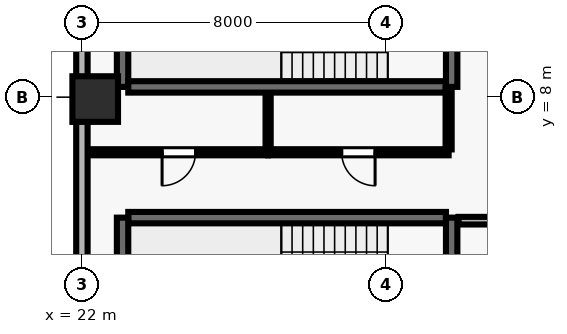
"""IFC4 building model, lengths in metres.
Left out: names, types, materials, properties, quantities, classifications, styles, units other than length and angle.
Written with IfcOpenShell. Run it as: python <this file> out.ifc"""

import sys

from ifc_helpers import new_model, si_unit, direction, frame, frame_2d, origin, origin_2d, place, context, subcontext, project, spatial, rectangle, extrude, element, fill, save


model = new_model("IFC4")
c1 = context("Model", 3, precision=1e-05, world=origin(), true_north=direction((0.0, 1.0)))
c2 = subcontext(c1, "Body", "Model", "MODEL_VIEW")
j1 = project(units=[si_unit("LENGTHUNIT", "METRE"), si_unit("PLANEANGLEUNIT", "RADIAN")], contexts=[c1])
p1 = place(None, origin())
s1 = spatial("IfcSite", under=j1, at=p1, CompositionType="ELEMENT")
p2 = place(p1, origin())
s2 = spatial("IfcBuilding", under=s1, at=p2, CompositionType="ELEMENT")
p3 = place(p2, frame((0.0, 0.0, 158.0)))
s3 = spatial("IfcBuildingStorey", under=s2, at=p3, CompositionType="ELEMENT", Elevation=158.0)
p4 = place(p3, frame((22.35, 7.95, 0.0), z_axis=(0.0, 0.0, 1.0), x_axis=(1.0, 0.0, 0.0)))
e1 = element("IfcColumn", 1, at=p4, inside=s3, PredefinedType="COLUMN", context=c2, shape_type="SweptSolid", body=[
    extrude(rectangle(XDim=1.2, YDim=1.2, at=origin_2d()), origin(), (0.0, 0.0, 1.0), 3.9),
])
p5 = place(p3, frame((22.0, 46.1, 0.0), z_axis=(0.0, 0.0, 1.0), x_axis=(0.0, -1.0, 0.0)))
e2 = element("IfcWall", 2, at=p5, inside=s3, PredefinedType="SOLIDWALL", context=c2, shape_type="SweptSolid", body=[
    extrude(rectangle(XDim=43.6, YDim=0.3, at=frame_2d((21.8, 0.0))), origin(), (0.0, 0.0, 1.0), 3.69),
])
p6 = place(p5, frame((7.1, 0.0, 0.0)))
e3 = element("IfcOpeningElement", 3, at=p6, cuts=e2, PredefinedType="OPENING", context=c2, shape_type="SweptSolid", body=[
    extrude(rectangle(XDim=1.0, YDim=2.2, at=frame_2d((0.5, 1.1))), frame((0.0, 0.16, 0.0), z_axis=(0.0, -1.0, 0.0), x_axis=(1.0, 0.0, 0.0)), (0.0, 0.0, 1.0), 0.32),
])
p7 = place(p5, frame((1.825, 0.0, 0.9)))
e4 = element("IfcOpeningElement", 4, at=p7, cuts=e2, PredefinedType="OPENING", context=c2, shape_type="SweptSolid", body=[
    extrude(rectangle(XDim=1.8, YDim=1.6, at=frame_2d((0.9, 0.8))), frame((0.0, 0.16, 0.0), z_axis=(0.0, -1.0, 0.0), x_axis=(1.0, 0.0, 0.0)), (0.0, 0.0, 1.0), 0.32),
])
p8 = place(p5, frame((13.625, 0.0, 0.9)))
e5 = element("IfcOpeningElement", 5, at=p8, cuts=e2, PredefinedType="OPENING", context=c2, shape_type="SweptSolid", body=[
    extrude(rectangle(XDim=1.8, YDim=1.6, at=frame_2d((0.9, 0.8))), frame((0.0, 0.16, 0.0), z_axis=(0.0, -1.0, 0.0), x_axis=(1.0, 0.0, 0.0)), (0.0, 0.0, 1.0), 0.32),
])
p9 = place(p5, frame((17.725, 0.0, 0.9)))
e6 = element("IfcOpeningElement", 6, at=p9, cuts=e2, PredefinedType="OPENING", context=c2, shape_type="SweptSolid", body=[
    extrude(rectangle(XDim=1.8, YDim=1.6, at=frame_2d((0.9, 0.8))), frame((0.0, 0.16, 0.0), z_axis=(0.0, -1.0, 0.0), x_axis=(1.0, 0.0, 0.0)), (0.0, 0.0, 1.0), 0.32),
])
p10 = place(p5, frame((23.625, 0.0, 0.9)))
e7 = element("IfcOpeningElement", 7, at=p10, cuts=e2, PredefinedType="OPENING", context=c2, shape_type="SweptSolid", body=[
    extrude(rectangle(XDim=1.8, YDim=1.6, at=frame_2d((0.9, 0.8))), frame((0.0, 0.16, 0.0), z_axis=(0.0, -1.0, 0.0), x_axis=(1.0, 0.0, 0.0)), (0.0, 0.0, 1.0), 0.32),
])
p11 = place(p5, frame((28.625, 0.0, 0.9)))
e8 = element("IfcOpeningElement", 8, at=p11, cuts=e2, PredefinedType="OPENING", context=c2, shape_type="SweptSolid", body=[
    extrude(rectangle(XDim=1.8, YDim=1.6, at=frame_2d((0.9, 0.8))), frame((0.0, 0.16, 0.0), z_axis=(0.0, -1.0, 0.0), x_axis=(1.0, 0.0, 0.0)), (0.0, 0.0, 1.0), 0.32),
])
p12 = place(p5, frame((34.525, 0.0, 0.9)))
e9 = element("IfcOpeningElement", 9, at=p12, cuts=e2, PredefinedType="OPENING", context=c2, shape_type="SweptSolid", body=[
    extrude(rectangle(XDim=1.8, YDim=1.6, at=frame_2d((0.9, 0.8))), frame((0.0, 0.16, 0.0), z_axis=(0.0, -1.0, 0.0), x_axis=(1.0, 0.0, 0.0)), (0.0, 0.0, 1.0), 0.32),
])
p13 = place(p3, frame((31.58, 4.83, 0.0), z_axis=(0.0, 0.0, 1.0), x_axis=(-1.0, 0.0, 0.0)))
e10 = element("IfcWall", 10, at=p13, inside=s3, PredefinedType="SHEAR", context=c2, shape_type="SweptSolid", body=[
    extrude(rectangle(XDim=8.36, YDim=0.3, at=frame_2d((4.18, 0.0))), origin(), (0.0, 0.0, 1.0), 3.69),
])
p14 = place(p3, frame((23.07, 4.83, 0.0), z_axis=(0.0, 0.0, 1.0), x_axis=(0.0, -1.0, 0.0)))
e11 = element("IfcWall", 11, at=p14, inside=s3, PredefinedType="SHEAR", context=c2, shape_type="SweptSolid", body=[
    extrude(rectangle(XDim=3.51, YDim=0.3, at=frame_2d((1.755, 0.0))), origin(), (0.0, 0.0, 1.0), 3.69),
])
p15 = place(p3, frame((31.73, 0.96, 0.0), z_axis=(0.0, 0.0, 1.0), x_axis=(0.0, 1.0, 0.0)))
e12 = element("IfcWall", 12, at=p15, inside=s3, PredefinedType="SHEAR", context=c2, shape_type="SweptSolid", body=[
    extrude(rectangle(XDim=3.87, YDim=0.3, at=frame_2d((1.935, 0.0))), origin(), (0.0, 0.0, 1.0), 3.69),
])
p16 = place(p15, frame((1.54, 0.0, 0.0)))
e13 = element("IfcOpeningElement", 13, at=p16, cuts=e12, PredefinedType="OPENING", context=c2, shape_type="SweptSolid", body=[
    extrude(rectangle(XDim=1.15, YDim=2.15, at=frame_2d((0.575, 1.075))), frame((0.0, 0.16, 0.0), z_axis=(0.0, -1.0, 0.0), x_axis=(1.0, 0.0, 0.0)), (0.0, 0.0, 1.0), 0.32),
])
p17 = place(p3, frame((23.07, 11.78, 0.0), z_axis=(0.0, 0.0, 1.0), x_axis=(0.0, -1.0, 0.0)))
e14 = element("IfcWall", 14, at=p17, inside=s3, PredefinedType="SHEAR", context=c2, shape_type="SweptSolid", body=[
    extrude(rectangle(XDim=3.51, YDim=0.3, at=frame_2d((1.755, 0.0))), origin(), (0.0, 0.0, 1.0), 3.69),
])
p18 = place(p3, frame((23.22, 8.27, 0.0), z_axis=(0.0, 0.0, 1.0), x_axis=(1.0, 0.0, 0.0)))
e15 = element("IfcWall", 15, at=p18, inside=s3, PredefinedType="SHEAR", context=c2, shape_type="SweptSolid", body=[
    extrude(rectangle(XDim=8.36, YDim=0.3, at=frame_2d((4.18, 0.0))), origin(), (0.0, 0.0, 1.0), 3.69),
])
p19 = place(p3, frame((31.73, 8.27, 0.0), z_axis=(0.0, 0.0, 1.0), x_axis=(0.0, 1.0, 0.0)))
e16 = element("IfcWall", 16, at=p19, inside=s3, PredefinedType="SHEAR", context=c2, shape_type="SweptSolid", body=[
    extrude(rectangle(XDim=3.51, YDim=0.3, at=frame_2d((1.755, 0.0))), origin(), (0.0, 0.0, 1.0), 3.69),
])
p20 = place(p19, frame((1.18, 0.0, 0.0)))
e17 = element("IfcOpeningElement", 17, at=p20, cuts=e16, PredefinedType="OPENING", context=c2, shape_type="SweptSolid", body=[
    extrude(rectangle(XDim=1.15, YDim=2.15, at=frame_2d((0.575, 1.075))), frame((0.0, 0.16, 0.0), z_axis=(0.0, -1.0, 0.0), x_axis=(1.0, 0.0, 0.0)), (0.0, 0.0, 1.0), 0.32),
])
p21 = place(p3, frame((26.9, 6.55, 0.0), z_axis=(0.0, 0.0, 1.0), x_axis=(-1.0, 0.0, 0.0)))
e18 = element("IfcWall", 18, at=p21, inside=s3, PredefinedType="PARTITIONING", context=c2, shape_type="SweptSolid", body=[
    extrude(rectangle(XDim=4.7, YDim=0.16, at=frame_2d((2.35, 0.0))), origin(), (0.0, 0.0, 1.0), 3.69),
])
p22 = place(p21, frame((1.91, 0.0, 0.0)))
e19 = element("IfcOpeningElement", 19, at=p22, cuts=e18, PredefinedType="OPENING", context=c2, shape_type="SweptSolid", body=[
    extrude(rectangle(XDim=0.88, YDim=2.1, at=frame_2d((0.44, 1.05))), frame((0.0, 0.09, 0.0), z_axis=(0.0, -1.0, 0.0), x_axis=(1.0, 0.0, 0.0)), (0.0, 0.0, 1.0), 0.18),
])
p23 = place(p3, frame((31.65, 6.55, 0.0), z_axis=(0.0, 0.0, 1.0), x_axis=(-1.0, 0.0, 0.0)))
e20 = element("IfcWall", 20, at=p23, inside=s3, PredefinedType="PARTITIONING", context=c2, shape_type="SweptSolid", body=[
    extrude(rectangle(XDim=4.75, YDim=0.16, at=frame_2d((2.375, 0.0))), origin(), (0.0, 0.0, 1.0), 3.69),
])
p24 = place(p23, frame((1.935, 0.0, 0.0)))
e21 = element("IfcOpeningElement", 21, at=p24, cuts=e20, PredefinedType="OPENING", context=c2, shape_type="SweptSolid", body=[
    extrude(rectangle(XDim=0.88, YDim=2.1, at=frame_2d((0.44, 1.05))), frame((0.0, 0.09, 0.0), z_axis=(0.0, -1.0, 0.0), x_axis=(1.0, 0.0, 0.0)), (0.0, 0.0, 1.0), 0.18),
])
p25 = place(p3, frame((35.02, 4.75, 0.0), z_axis=(0.0, 0.0, 1.0), x_axis=(-1.0, 0.0, 0.0)))
e22 = element("IfcWall", 22, at=p25, inside=s3, PredefinedType="SOLIDWALL", context=c2, shape_type="SweptSolid", body=[
    extrude(rectangle(XDim=3.11, YDim=0.2, at=frame_2d((1.555, 0.0))), origin(), (0.0, 0.0, 1.0), 3.69),
])
p26 = place(p25, frame((1.03, 0.0, 0.0)))
e23 = element("IfcOpeningElement", 23, at=p26, cuts=e22, PredefinedType="OPENING", context=c2, shape_type="SweptSolid", body=[
    extrude(rectangle(XDim=1.05, YDim=2.15, at=frame_2d((0.525, 1.075))), frame((0.0, 0.11, 0.0), z_axis=(0.0, -1.0, 0.0), x_axis=(1.0, 0.0, 0.0)), (0.0, 0.0, 1.0), 0.22),
])
p27 = place(p3, frame((26.9, 6.625, 0.0), z_axis=(0.0, 0.0, 1.0), x_axis=(0.0, 1.0, 0.0)))
e24 = element("IfcWall", 24, at=p27, inside=s3, PredefinedType="PARTITIONING", context=c2, shape_type="SweptSolid", body=[
    extrude(rectangle(XDim=1.465, YDim=0.135, at=frame_2d((0.732, 0.0))), origin(), (0.0, 0.0, 1.0), 3.69),
])
p28 = place(p3, frame((31.65, 8.24, 0.0), z_axis=(0.0, 0.0, 1.0), x_axis=(0.0, -1.0, 0.0)))
e25 = element("IfcWall", 25, at=p28, inside=s3, PredefinedType="PARTITIONING", context=c2, shape_type="SweptSolid", body=[
    extrude(rectangle(XDim=1.615, YDim=0.16, at=frame_2d((0.808, 0.0))), origin(), (0.0, 0.0, 1.0), 3.69),
])
p29 = place(p22, origin())
e26 = element("IfcDoor", 26, at=p29, inside=s3, OperationType="SINGLE_SWING_RIGHT", PredefinedType="DOOR", context=c2, shape_type="SweptSolid", body=[
    extrude(rectangle(XDim=0.88, YDim=2.1, at=frame_2d((0.44, 1.05))), frame((0.0, 0.025, 0.0), z_axis=(0.0, -1.0, 0.0), x_axis=(1.0, 0.0, 0.0)), (0.0, 0.0, 1.0), 0.05),
])
fill(e19, e26)
p30 = place(p24, origin())
e27 = element("IfcDoor", 27, at=p30, inside=s3, OperationType="SINGLE_SWING_LEFT", PredefinedType="DOOR", context=c2, shape_type="SweptSolid", body=[
    extrude(rectangle(XDim=0.88, YDim=2.1, at=frame_2d((0.44, 1.05))), frame((0.0, 0.025, 0.0), z_axis=(0.0, -1.0, 0.0), x_axis=(1.0, 0.0, 0.0)), (0.0, 0.0, 1.0), 0.05),
])
fill(e21, e27)
save(model, sys.argv[1])
